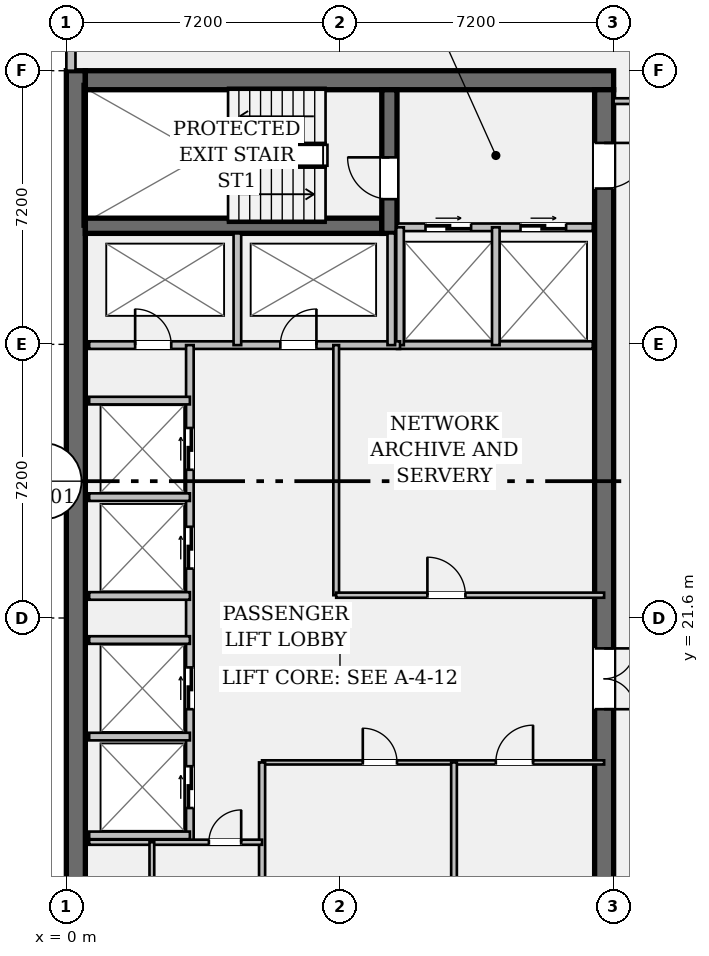
"""IFC4 building model, lengths in metres.
Left out: names, types, materials, properties, quantities, classifications, styles, units other than length and angle.
Written with IfcOpenShell. Run it as: python <this file> out.ifc"""

import sys

from ifc_helpers import new_model, si_unit, direction, frame, frame_2d, origin, place, context, subcontext, project, spatial, rectangle, extrude, element, fill, save


model = new_model("IFC4")
c1 = context("Model", 3, precision=1e-05, world=origin(), true_north=direction((0.0, 1.0)))
c2 = subcontext(c1, "Body", "Model", "MODEL_VIEW")
j1 = project(units=[si_unit("LENGTHUNIT", "METRE"), si_unit("PLANEANGLEUNIT", "RADIAN")], contexts=[c1])
p1 = place(None, origin())
s1 = spatial("IfcSite", under=j1, at=p1, CompositionType="ELEMENT")
p2 = place(p1, origin())
s2 = spatial("IfcBuilding", under=s1, at=p2, CompositionType="ELEMENT")
p3 = place(p2, frame((0.0, 0.0, 218.75)))
s3 = spatial("IfcBuildingStorey", under=s2, at=p3, CompositionType="ELEMENT", Elevation=218.75)
p4 = place(p3, frame((0.25, 7.2, 0.0), z_axis=(0.0, 0.0, 1.0), x_axis=(0.0, 1.0, 0.0)))
e1 = element("IfcWall", 1, at=p4, inside=s3, PredefinedType="SHEAR", context=c2, shape_type="SweptSolid", body=[
    extrude(rectangle(XDim=28.8, YDim=0.5, at=frame_2d((14.4, 0.0))), origin(), (0.0, 0.0, 1.0), 3.24),
])
p5 = place(p3, frame((0.5, 35.75, 0.0), z_axis=(0.0, 0.0, 1.0), x_axis=(1.0, 0.0, 0.0)))
e2 = element("IfcWall", 2, at=p5, inside=s3, PredefinedType="SHEAR", context=c2, shape_type="SweptSolid", body=[
    extrude(rectangle(XDim=13.9, YDim=0.5, at=frame_2d((6.95, 0.0))), origin(), (0.0, 0.0, 1.0), 3.24),
])
p6 = place(p3, frame((14.15, 35.5, 0.0), z_axis=(0.0, 0.0, 1.0), x_axis=(0.0, -1.0, 0.0)))
e3 = element("IfcWall", 3, at=p6, inside=s3, PredefinedType="SHEAR", context=c2, shape_type="SweptSolid", body=[
    extrude(rectangle(XDim=27.8, YDim=0.5, at=frame_2d((13.9, 0.0))), origin(), (0.0, 0.0, 1.0), 3.24),
])
p7 = place(p6, frame((1.4, 0.0, 0.0)))
e4 = element("IfcOpeningElement", 4, at=p7, cuts=e3, PredefinedType="OPENING", context=c2, shape_type="SweptSolid", body=[
    extrude(rectangle(XDim=1.2, YDim=2.15, at=frame_2d((0.6, 1.075))), frame((0.0, 0.262, 0.0), z_axis=(0.0, -1.0, 0.0), x_axis=(1.0, 0.0, 0.0)), (0.0, 0.0, 1.0), 0.524),
])
p8 = place(p6, frame((25.35, 0.0, 0.0)))
e5 = element("IfcOpeningElement", 5, at=p8, cuts=e3, PredefinedType="OPENING", context=c2, shape_type="SweptSolid", body=[
    extrude(rectangle(XDim=1.2, YDim=2.15, at=frame_2d((0.6, 1.075))), frame((0.0, 0.262, 0.0), z_axis=(0.0, -1.0, 0.0), x_axis=(1.0, 0.0, 0.0)), (0.0, 0.0, 1.0), 0.524),
])
p9 = place(p6, frame((14.7, 0.0, 0.0)))
e6 = element("IfcOpeningElement", 6, at=p9, cuts=e3, PredefinedType="OPENING", context=c2, shape_type="SweptSolid", body=[
    extrude(rectangle(XDim=1.6, YDim=2.2, at=frame_2d((0.8, 1.1))), frame((0.0, 0.262, 0.0), z_axis=(0.0, -1.0, 0.0), x_axis=(1.0, 0.0, 0.0)), (0.0, 0.0, 1.0), 0.524),
])
p10 = place(p3, frame((0.5, 31.92, 0.0), z_axis=(0.0, 0.0, 1.0), x_axis=(1.0, 0.0, 0.0)))
e7 = element("IfcWall", 7, at=p10, inside=s3, PredefinedType="SHEAR", context=c2, shape_type="SweptSolid", body=[
    extrude(rectangle(XDim=7.8, YDim=0.4, at=frame_2d((3.9, 0.0))), origin(), (0.0, 0.0, 1.0), 3.24),
])
p11 = place(p3, frame((8.5, 31.72, 0.0), z_axis=(0.0, 0.0, 1.0), x_axis=(0.0, 1.0, 0.0)))
e8 = element("IfcWall", 8, at=p11, inside=s3, PredefinedType="SHEAR", context=c2, shape_type="SweptSolid", body=[
    extrude(rectangle(XDim=3.78, YDim=0.4, at=frame_2d((1.89, 0.0))), origin(), (0.0, 0.0, 1.0), 3.24),
])
p12 = place(p11, frame((0.9, 0.0, 0.0)))
e9 = element("IfcOpeningElement", 9, at=p12, cuts=e8, PredefinedType="OPENING", context=c2, shape_type="SweptSolid", body=[
    extrude(rectangle(XDim=1.1, YDim=2.15, at=frame_2d((0.55, 1.075))), frame((0.0, 0.212, 0.0), z_axis=(0.0, -1.0, 0.0), x_axis=(1.0, 0.0, 0.0)), (0.0, 0.0, 1.0), 0.424),
])
p13 = place(p3, frame((0.12, 36.0, 0.0), z_axis=(0.0, 0.0, 1.0), x_axis=(0.0, 1.0, 0.0)))
e10 = element("IfcWall", 10, at=p13, inside=s3, PredefinedType="STANDARD", context=c2, shape_type="SweptSolid", body=[
    extrude(rectangle(XDim=1.21, YDim=0.24, at=frame_2d((0.605, 0.0))), origin(), (0.0, 0.0, 1.0), 3.24),
])
p14 = place(p3, frame((8.7, 31.88, 0.0), z_axis=(0.0, 0.0, 1.0), x_axis=(1.0, 0.0, 0.0)))
e11 = element("IfcWall", 11, at=p14, inside=s3, PredefinedType="PARTITIONING", context=c2, shape_type="SweptSolid", body=[
    extrude(rectangle(XDim=5.15, YDim=0.2, at=frame_2d((2.575, 0.0))), origin(), (0.0, 0.0, 1.0), 3.24),
])
p15 = place(p14, frame((0.75, 0.0, 0.0)))
e12 = element("IfcOpeningElement", 12, at=p15, cuts=e11, PredefinedType="OPENING", context=c2, shape_type="SweptSolid", body=[
    extrude(rectangle(XDim=1.2, YDim=2.2, at=frame_2d((0.6, 1.1))), frame((0.0, 0.112, 0.0), z_axis=(0.0, -1.0, 0.0), x_axis=(1.0, 0.0, 0.0)), (0.0, 0.0, 1.0), 0.224),
])
p16 = place(p14, frame((3.25, 0.0, 0.0)))
e13 = element("IfcOpeningElement", 13, at=p16, cuts=e11, PredefinedType="OPENING", context=c2, shape_type="SweptSolid", body=[
    extrude(rectangle(XDim=1.2, YDim=2.2, at=frame_2d((0.6, 1.1))), frame((0.0, 0.112, 0.0), z_axis=(0.0, -1.0, 0.0), x_axis=(1.0, 0.0, 0.0)), (0.0, 0.0, 1.0), 0.224),
])
p17 = place(p3, frame((8.7, 28.78, 0.0), z_axis=(0.0, 0.0, 1.0), x_axis=(1.0, 0.0, 0.0)))
e14 = element("IfcWall", 14, at=p17, inside=s3, PredefinedType="PARTITIONING", context=c2, shape_type="SweptSolid", body=[
    extrude(rectangle(XDim=5.15, YDim=0.2, at=frame_2d((2.575, 0.0))), origin(), (0.0, 0.0, 1.0), 3.24),
])
for number, where, z_axis, x_axis in (
    (15, (8.78, 28.78, 0.0), (0.0, 0.0, 1.0), (0.0, 1.0, 0.0)),
    (16, (11.3, 28.78, 0.0), (0.0, 0.0, 1.0), (0.0, 1.0, 0.0)),
):
    element("IfcWall", number, at=place(p3, frame(where, z_axis=z_axis, x_axis=x_axis)), inside=s3, PredefinedType="PARTITIONING", context=c2, shape_type="SweptSolid", body=[
        extrude(rectangle(XDim=3.1, YDim=0.2, at=frame_2d((1.55, 0.0))), origin(), (0.0, 0.0, 1.0), 3.24),
    ])
p18 = place(p3, frame((0.6, 28.78, 0.0), z_axis=(0.0, 0.0, 1.0), x_axis=(1.0, 0.0, 0.0)))
e17 = element("IfcWall", 17, at=p18, inside=s3, PredefinedType="PARTITIONING", context=c2, shape_type="SweptSolid", body=[
    extrude(rectangle(XDim=8.18, YDim=0.2, at=frame_2d((4.09, 0.0))), origin(), (0.0, 0.0, 1.0), 3.24),
])
p19 = place(p18, frame((1.21, 0.0, 0.0)))
e18 = element("IfcOpeningElement", 18, at=p19, cuts=e17, PredefinedType="OPENING", context=c2, shape_type="SweptSolid", body=[
    extrude(rectangle(XDim=0.95, YDim=2.15, at=frame_2d((0.475, 1.075))), frame((0.0, 0.112, 0.0), z_axis=(0.0, -1.0, 0.0), x_axis=(1.0, 0.0, 0.0)), (0.0, 0.0, 1.0), 0.224),
])
p20 = place(p18, frame((5.03, 0.0, 0.0)))
e19 = element("IfcOpeningElement", 19, at=p20, cuts=e17, PredefinedType="OPENING", context=c2, shape_type="SweptSolid", body=[
    extrude(rectangle(XDim=0.95, YDim=2.15, at=frame_2d((0.475, 1.075))), frame((0.0, 0.112, 0.0), z_axis=(0.0, -1.0, 0.0), x_axis=(1.0, 0.0, 0.0)), (0.0, 0.0, 1.0), 0.224),
])
for number, where, z_axis, x_axis in (
    (20, (4.5, 28.78, 0.0), (0.0, 0.0, 1.0), (0.0, 1.0, 0.0)),
    (21, (8.55, 28.78, 0.0), (0.0, 0.0, 1.0), (0.0, 1.0, 0.0)),
):
    element("IfcWall", number, at=place(p3, frame(where, z_axis=z_axis, x_axis=x_axis)), inside=s3, PredefinedType="PARTITIONING", context=c2, shape_type="SweptSolid", body=[
        extrude(rectangle(XDim=2.94, YDim=0.2, at=frame_2d((1.47, 0.0))), origin(), (0.0, 0.0, 1.0), 3.24),
    ])
p21 = place(p3, frame((3.25, 15.7, 0.0), z_axis=(0.0, 0.0, 1.0), x_axis=(0.0, 1.0, 0.0)))
e22 = element("IfcWall", 22, at=p21, inside=s3, PredefinedType="PARTITIONING", context=c2, shape_type="SweptSolid", body=[
    extrude(rectangle(XDim=13.08, YDim=0.2, at=frame_2d((6.54, 0.0))), origin(), (0.0, 0.0, 1.0), 3.24),
])
p22 = place(p21, frame((0.9, 0.0, 0.0)))
e23 = element("IfcOpeningElement", 23, at=p22, cuts=e22, PredefinedType="OPENING", context=c2, shape_type="SweptSolid", body=[
    extrude(rectangle(XDim=1.1, YDim=2.2, at=frame_2d((0.55, 1.1))), frame((0.0, 0.112, 0.0), z_axis=(0.0, -1.0, 0.0), x_axis=(1.0, 0.0, 0.0)), (0.0, 0.0, 1.0), 0.224),
])
p23 = place(p21, frame((3.5, 0.0, 0.0)))
e24 = element("IfcOpeningElement", 24, at=p23, cuts=e22, PredefinedType="OPENING", context=c2, shape_type="SweptSolid", body=[
    extrude(rectangle(XDim=1.1, YDim=2.2, at=frame_2d((0.55, 1.1))), frame((0.0, 0.112, 0.0), z_axis=(0.0, -1.0, 0.0), x_axis=(1.0, 0.0, 0.0)), (0.0, 0.0, 1.0), 0.224),
])
p24 = place(p21, frame((7.2, 0.0, 0.0)))
e25 = element("IfcOpeningElement", 25, at=p24, cuts=e22, PredefinedType="OPENING", context=c2, shape_type="SweptSolid", body=[
    extrude(rectangle(XDim=1.1, YDim=2.2, at=frame_2d((0.55, 1.1))), frame((0.0, 0.112, 0.0), z_axis=(0.0, -1.0, 0.0), x_axis=(1.0, 0.0, 0.0)), (0.0, 0.0, 1.0), 0.224),
])
p25 = place(p21, frame((9.8, 0.0, 0.0)))
e26 = element("IfcOpeningElement", 26, at=p25, cuts=e22, PredefinedType="OPENING", context=c2, shape_type="SweptSolid", body=[
    extrude(rectangle(XDim=1.1, YDim=2.2, at=frame_2d((0.55, 1.1))), frame((0.0, 0.112, 0.0), z_axis=(0.0, -1.0, 0.0), x_axis=(1.0, 0.0, 0.0)), (0.0, 0.0, 1.0), 0.224),
])
for number, where, z_axis, x_axis in (
    (27, (0.6, 15.88, 0.0), (0.0, 0.0, 1.0), (1.0, 0.0, 0.0)),
    (28, (0.6, 18.48, 0.0), (0.0, 0.0, 1.0), (1.0, 0.0, 0.0)),
    (29, (0.6, 22.18, 0.0), (0.0, 0.0, 1.0), (1.0, 0.0, 0.0)),
    (30, (0.6, 24.78, 0.0), (0.0, 0.0, 1.0), (1.0, 0.0, 0.0)),
    (31, (0.6, 21.02, 0.0), (0.0, 0.0, 1.0), (1.0, 0.0, 0.0)),
    (32, (0.6, 27.32, 0.0), (0.0, 0.0, 1.0), (1.0, 0.0, 0.0)),
):
    element("IfcWall", number, at=place(p3, frame(where, z_axis=z_axis, x_axis=x_axis)), inside=s3, PredefinedType="PARTITIONING", context=c2, shape_type="SweptSolid", body=[
        extrude(rectangle(XDim=2.65, YDim=0.2, at=frame_2d((1.325, 0.0))), origin(), (0.0, 0.0, 1.0), 3.24),
    ])
p26 = place(p3, frame((7.1, 22.2, 0.0), z_axis=(0.0, 0.0, 1.0), x_axis=(0.0, 1.0, 0.0)))
e33 = element("IfcWall", 33, at=p26, inside=s3, PredefinedType="PARTITIONING", context=c2, shape_type="SweptSolid", body=[
    extrude(rectangle(XDim=6.58, YDim=0.15, at=frame_2d((3.29, 0.0))), origin(), (0.0, 0.0, 1.0), 3.24),
])
p27 = place(p3, frame((7.1, 22.2, 0.0), z_axis=(0.0, 0.0, 1.0), x_axis=(1.0, 0.0, 0.0)))
e34 = element("IfcWall", 34, at=p27, inside=s3, PredefinedType="PARTITIONING", context=c2, shape_type="SweptSolid", body=[
    extrude(rectangle(XDim=7.05, YDim=0.135, at=frame_2d((3.525, 0.0))), origin(), (0.0, 0.0, 1.0), 3.24),
])
p28 = place(p27, frame((2.4, 0.0, 0.0)))
e35 = element("IfcOpeningElement", 35, at=p28, cuts=e34, PredefinedType="OPENING", context=c2, shape_type="SweptSolid", body=[
    extrude(rectangle(XDim=1.0, YDim=2.15, at=frame_2d((0.5, 1.075))), frame((0.0, 0.08, 0.0), z_axis=(0.0, -1.0, 0.0), x_axis=(1.0, 0.0, 0.0)), (0.0, 0.0, 1.0), 0.159),
])
p29 = place(p3, frame((5.15, 17.8, 0.0), z_axis=(0.0, 0.0, 1.0), x_axis=(1.0, 0.0, 0.0)))
e36 = element("IfcWall", 36, at=p29, inside=s3, PredefinedType="PARTITIONING", context=c2, shape_type="SweptSolid", body=[
    extrude(rectangle(XDim=9.0, YDim=0.11, at=frame_2d((4.5, 0.0))), origin(), (0.0, 0.0, 1.0), 3.24),
])
p30 = place(p29, frame((2.65, 0.0, 0.0)))
e37 = element("IfcOpeningElement", 37, at=p30, cuts=e36, PredefinedType="OPENING", context=c2, shape_type="SweptSolid", body=[
    extrude(rectangle(XDim=0.9, YDim=2.15, at=frame_2d((0.45, 1.075))), frame((0.0, 0.067, 0.0), z_axis=(0.0, -1.0, 0.0), x_axis=(1.0, 0.0, 0.0)), (0.0, 0.0, 1.0), 0.134),
])
p31 = place(p29, frame((6.15, 0.0, 0.0)))
e38 = element("IfcOpeningElement", 38, at=p31, cuts=e36, PredefinedType="OPENING", context=c2, shape_type="SweptSolid", body=[
    extrude(rectangle(XDim=0.98, YDim=2.15, at=frame_2d((0.49, 1.075))), frame((0.0, 0.067, 0.0), z_axis=(0.0, -1.0, 0.0), x_axis=(1.0, 0.0, 0.0)), (0.0, 0.0, 1.0), 0.134),
])
p32 = place(p3, frame((5.15, 11.2, 0.0), z_axis=(0.0, 0.0, 1.0), x_axis=(0.0, 1.0, 0.0)))
e39 = element("IfcWall", 39, at=p32, inside=s3, PredefinedType="PARTITIONING", context=c2, shape_type="SweptSolid", body=[
    extrude(rectangle(XDim=6.6, YDim=0.16, at=frame_2d((3.3, 0.0))), origin(), (0.0, 0.0, 1.0), 3.24),
])
p33 = place(p3, frame((10.2, 11.2, 0.0), z_axis=(0.0, 0.0, 1.0), x_axis=(0.0, 1.0, 0.0)))
e40 = element("IfcWall", 40, at=p33, inside=s3, PredefinedType="PARTITIONING", context=c2, shape_type="SweptSolid", body=[
    extrude(rectangle(XDim=6.6, YDim=0.15, at=frame_2d((3.3, 0.0))), origin(), (0.0, 0.0, 1.0), 3.24),
])
p34 = place(p3, frame((0.6, 15.7, 0.0), z_axis=(0.0, 0.0, 1.0), x_axis=(1.0, 0.0, 0.0)))
e41 = element("IfcWall", 41, at=p34, inside=s3, PredefinedType="PARTITIONING", context=c2, shape_type="SweptSolid", body=[
    extrude(rectangle(XDim=4.55, YDim=0.135, at=frame_2d((2.275, 0.0))), origin(), (0.0, 0.0, 1.0), 3.24),
])
p35 = place(p34, frame((3.15, 0.0, 0.0)))
e42 = element("IfcOpeningElement", 42, at=p35, cuts=e41, PredefinedType="OPENING", context=c2, shape_type="SweptSolid", body=[
    extrude(rectangle(XDim=0.85, YDim=2.15, at=frame_2d((0.425, 1.075))), frame((0.0, 0.08, 0.0), z_axis=(0.0, -1.0, 0.0), x_axis=(1.0, 0.0, 0.0)), (0.0, 0.0, 1.0), 0.159),
])
p36 = place(p3, frame((2.25, 11.28, 0.0), z_axis=(0.0, 0.0, 1.0), x_axis=(0.0, 1.0, 0.0)))
e43 = element("IfcWall", 43, at=p36, inside=s3, PredefinedType="PARTITIONING", context=c2, shape_type="SweptSolid", body=[
    extrude(rectangle(XDim=4.42, YDim=0.125, at=frame_2d((2.21, 0.0))), origin(), (0.0, 0.0, 1.0), 3.24),
])
p37 = place(p36, frame((1.65, 0.0, 0.0)))
e44 = element("IfcOpeningElement", 44, at=p37, cuts=e43, PredefinedType="OPENING", context=c2, shape_type="SweptSolid", body=[
    extrude(rectangle(XDim=0.85, YDim=2.15, at=frame_2d((0.425, 1.075))), frame((0.0, 0.074, 0.0), z_axis=(0.0, -1.0, 0.0), x_axis=(1.0, 0.0, 0.0)), (0.0, 0.0, 1.0), 0.149),
])
p38 = place(p3, frame((14.4, 35.2, 0.0), z_axis=(0.0, 0.0, 1.0), x_axis=(1.0, 0.0, 0.0)))
e45 = element("IfcWall", 45, at=p38, inside=s3, PredefinedType="PARTITIONING", context=c2, shape_type="SweptSolid", body=[
    extrude(rectangle(XDim=2.95, YDim=0.15, at=frame_2d((1.475, 0.0))), origin(), (0.0, 0.0, 1.0), 2.808),
])
p39 = place(p38, frame((0.95, 0.0, 0.0)))
e46 = element("IfcOpeningElement", 46, at=p39, cuts=e45, PredefinedType="OPENING", context=c2, shape_type="SweptSolid", body=[
    extrude(rectangle(XDim=1.0, YDim=2.15, at=frame_2d((0.5, 1.075))), frame((0.0, 0.087, 0.0), z_axis=(0.0, -1.0, 0.0), x_axis=(1.0, 0.0, 0.0)), (0.0, 0.0, 1.0), 0.174),
])
p40 = place(p12, origin())
e47 = element("IfcDoor", 47, at=p40, inside=s3, OperationType="SINGLE_SWING_RIGHT", PredefinedType="DOOR", context=c2, shape_type="SweptSolid", body=[
    extrude(rectangle(XDim=1.1, YDim=2.15, at=frame_2d((0.55, 1.075))), frame((0.0, 0.025, 0.0), z_axis=(0.0, -1.0, 0.0), x_axis=(1.0, 0.0, 0.0)), (0.0, 0.0, 1.0), 0.05),
])
fill(e9, e47)
p41 = place(p7, origin())
e48 = element("IfcDoor", 48, at=p41, inside=s3, OperationType="SINGLE_SWING_LEFT", PredefinedType="DOOR", context=c2, shape_type="SweptSolid", body=[
    extrude(rectangle(XDim=1.2, YDim=2.15, at=frame_2d((0.6, 1.075))), frame((0.0, 0.025, 0.0), z_axis=(0.0, -1.0, 0.0), x_axis=(1.0, 0.0, 0.0)), (0.0, 0.0, 1.0), 0.05),
])
fill(e4, e48)
p42 = place(p15, origin())
e49 = element("IfcDoor", 49, at=p42, inside=s3, OperationType="DOUBLE_DOOR_SLIDING", PredefinedType="DOOR", context=c2, shape_type="SweptSolid", body=[
    extrude(rectangle(XDim=1.2, YDim=2.2, at=frame_2d((0.6, 1.1))), frame((0.0, 0.025, 0.0), z_axis=(0.0, -1.0, 0.0), x_axis=(1.0, 0.0, 0.0)), (0.0, 0.0, 1.0), 0.05),
])
fill(e12, e49)
p43 = place(p16, origin())
e50 = element("IfcDoor", 50, at=p43, inside=s3, OperationType="DOUBLE_DOOR_SLIDING", PredefinedType="DOOR", context=c2, shape_type="SweptSolid", body=[
    extrude(rectangle(XDim=1.2, YDim=2.2, at=frame_2d((0.6, 1.1))), frame((0.0, 0.025, 0.0), z_axis=(0.0, -1.0, 0.0), x_axis=(1.0, 0.0, 0.0)), (0.0, 0.0, 1.0), 0.05),
])
fill(e13, e50)
p44 = place(p19, origin())
e51 = element("IfcDoor", 51, at=p44, inside=s3, OperationType="SINGLE_SWING_LEFT", PredefinedType="DOOR", context=c2, shape_type="SweptSolid", body=[
    extrude(rectangle(XDim=0.95, YDim=2.15, at=frame_2d((0.475, 1.075))), frame((0.0, 0.025, 0.0), z_axis=(0.0, -1.0, 0.0), x_axis=(1.0, 0.0, 0.0)), (0.0, 0.0, 1.0), 0.05),
])
fill(e18, e51)
p45 = place(p20, origin())
e52 = element("IfcDoor", 52, at=p45, inside=s3, OperationType="SINGLE_SWING_RIGHT", PredefinedType="DOOR", context=c2, shape_type="SweptSolid", body=[
    extrude(rectangle(XDim=0.95, YDim=2.15, at=frame_2d((0.475, 1.075))), frame((0.0, 0.025, 0.0), z_axis=(0.0, -1.0, 0.0), x_axis=(1.0, 0.0, 0.0)), (0.0, 0.0, 1.0), 0.05),
])
fill(e19, e52)
p46 = place(p9, origin())
e53 = element("IfcDoor", 53, at=p46, inside=s3, OperationType="DOUBLE_DOOR_SINGLE_SWING", PredefinedType="DOOR", context=c2, shape_type="SweptSolid", body=[
    extrude(rectangle(XDim=1.6, YDim=2.2, at=frame_2d((0.8, 1.1))), frame((0.0, 0.025, 0.0), z_axis=(0.0, -1.0, 0.0), x_axis=(1.0, 0.0, 0.0)), (0.0, 0.0, 1.0), 0.05),
])
fill(e6, e53)
p47 = place(p22, origin())
e54 = element("IfcDoor", 54, at=p47, inside=s3, OperationType="DOUBLE_DOOR_SLIDING", PredefinedType="DOOR", context=c2, shape_type="SweptSolid", body=[
    extrude(rectangle(XDim=1.1, YDim=2.2, at=frame_2d((0.55, 1.1))), frame((0.0, 0.025, 0.0), z_axis=(0.0, -1.0, 0.0), x_axis=(1.0, 0.0, 0.0)), (0.0, 0.0, 1.0), 0.05),
])
fill(e23, e54)
p48 = place(p23, origin())
e55 = element("IfcDoor", 55, at=p48, inside=s3, OperationType="DOUBLE_DOOR_SLIDING", PredefinedType="DOOR", context=c2, shape_type="SweptSolid", body=[
    extrude(rectangle(XDim=1.1, YDim=2.2, at=frame_2d((0.55, 1.1))), frame((0.0, 0.025, 0.0), z_axis=(0.0, -1.0, 0.0), x_axis=(1.0, 0.0, 0.0)), (0.0, 0.0, 1.0), 0.05),
])
fill(e24, e55)
p49 = place(p24, origin())
e56 = element("IfcDoor", 56, at=p49, inside=s3, OperationType="DOUBLE_DOOR_SLIDING", PredefinedType="DOOR", context=c2, shape_type="SweptSolid", body=[
    extrude(rectangle(XDim=1.1, YDim=2.2, at=frame_2d((0.55, 1.1))), frame((0.0, 0.025, 0.0), z_axis=(0.0, -1.0, 0.0), x_axis=(1.0, 0.0, 0.0)), (0.0, 0.0, 1.0), 0.05),
])
fill(e25, e56)
p50 = place(p25, origin())
e57 = element("IfcDoor", 57, at=p50, inside=s3, OperationType="DOUBLE_DOOR_SLIDING", PredefinedType="DOOR", context=c2, shape_type="SweptSolid", body=[
    extrude(rectangle(XDim=1.1, YDim=2.2, at=frame_2d((0.55, 1.1))), frame((0.0, 0.025, 0.0), z_axis=(0.0, -1.0, 0.0), x_axis=(1.0, 0.0, 0.0)), (0.0, 0.0, 1.0), 0.05),
])
fill(e26, e57)
p51 = place(p28, origin())
e58 = element("IfcDoor", 58, at=p51, inside=s3, OperationType="SINGLE_SWING_LEFT", PredefinedType="DOOR", context=c2, shape_type="SweptSolid", body=[
    extrude(rectangle(XDim=1.0, YDim=2.15, at=frame_2d((0.5, 1.075))), frame((0.0, 0.025, 0.0), z_axis=(0.0, -1.0, 0.0), x_axis=(1.0, 0.0, 0.0)), (0.0, 0.0, 1.0), 0.05),
])
fill(e35, e58)
p52 = place(p30, origin())
e59 = element("IfcDoor", 59, at=p52, inside=s3, OperationType="SINGLE_SWING_LEFT", PredefinedType="DOOR", context=c2, shape_type="SweptSolid", body=[
    extrude(rectangle(XDim=0.9, YDim=2.15, at=frame_2d((0.45, 1.075))), frame((0.0, 0.025, 0.0), z_axis=(0.0, -1.0, 0.0), x_axis=(1.0, 0.0, 0.0)), (0.0, 0.0, 1.0), 0.05),
])
fill(e37, e59)
p53 = place(p31, origin())
e60 = element("IfcDoor", 60, at=p53, inside=s3, OperationType="SINGLE_SWING_RIGHT", PredefinedType="DOOR", context=c2, shape_type="SweptSolid", body=[
    extrude(rectangle(XDim=0.98, YDim=2.15, at=frame_2d((0.49, 1.075))), frame((0.0, 0.025, 0.0), z_axis=(0.0, -1.0, 0.0), x_axis=(1.0, 0.0, 0.0)), (0.0, 0.0, 1.0), 0.05),
])
fill(e38, e60)
p54 = place(p35, origin())
e61 = element("IfcDoor", 61, at=p54, inside=s3, OperationType="SINGLE_SWING_RIGHT", PredefinedType="DOOR", context=c2, shape_type="SweptSolid", body=[
    extrude(rectangle(XDim=0.85, YDim=2.15, at=frame_2d((0.425, 1.075))), frame((0.0, 0.025, 0.0), z_axis=(0.0, -1.0, 0.0), x_axis=(1.0, 0.0, 0.0)), (0.0, 0.0, 1.0), 0.05),
])
fill(e42, e61)
save(model, sys.argv[1])
